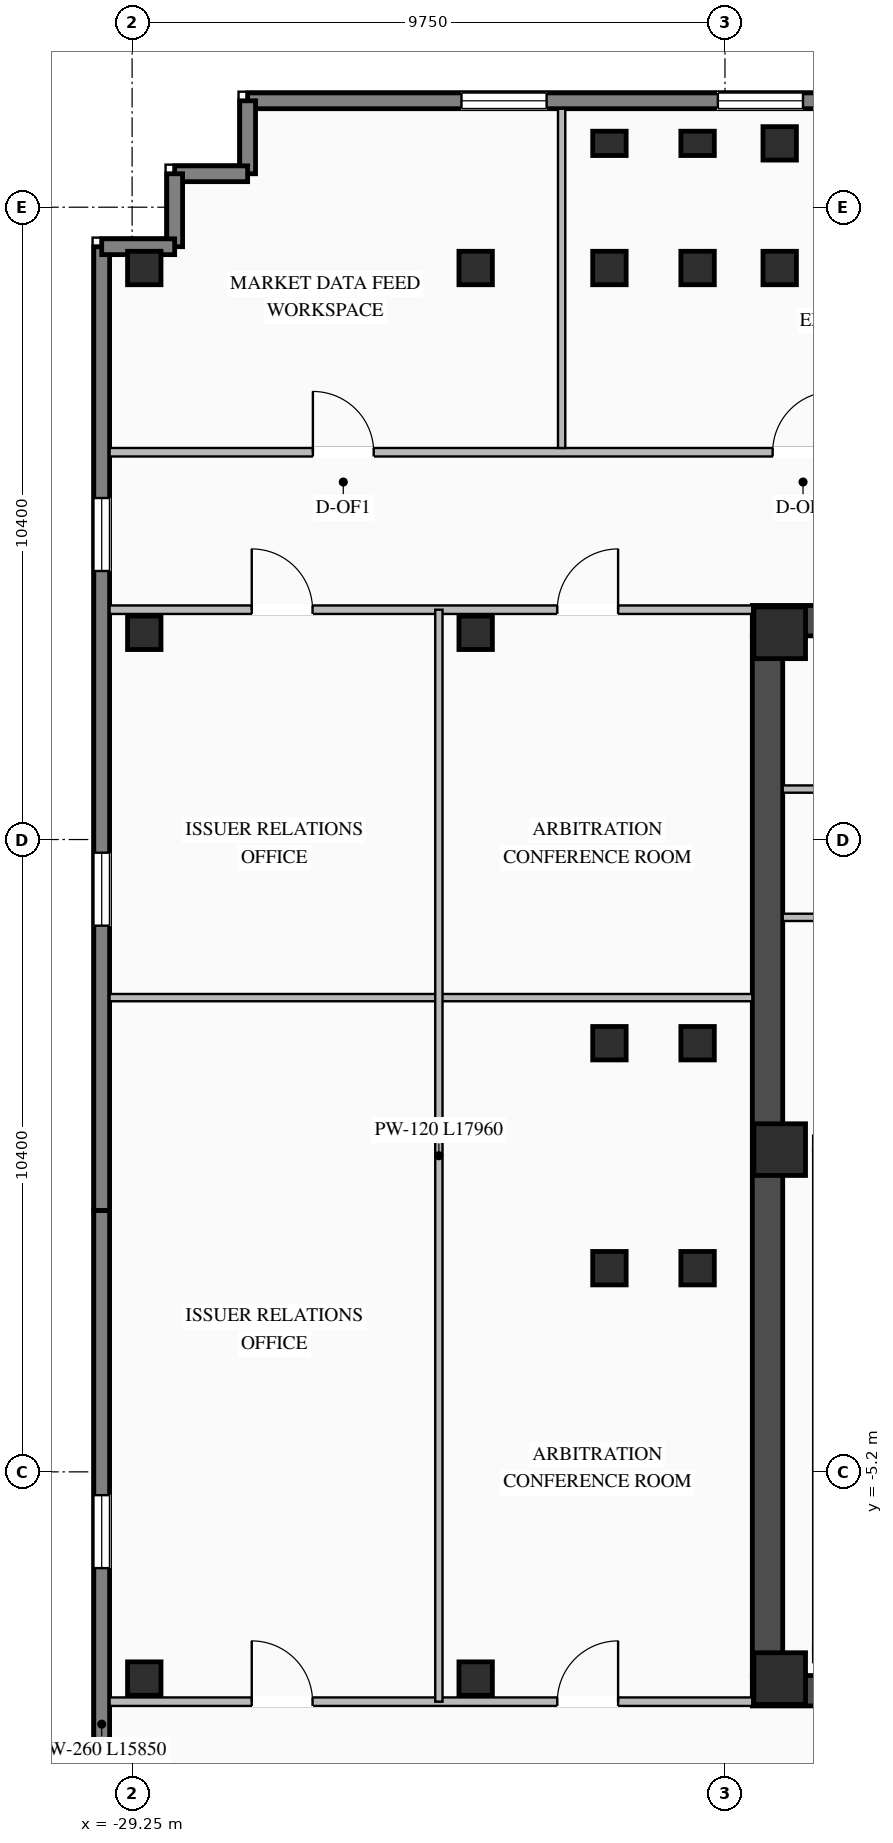
"""IFC4 building model, lengths in metres.
Left out: names, types, materials, properties, quantities, classifications, styles, units other than length and angle.
Written with IfcOpenShell. Run it as: python <this file> out.ifc"""

import sys

from ifc_helpers import new_model, si_unit, direction, frame, frame_2d, origin, origin_2d, place, context, subcontext, project, spatial, rectangle, i_section, extrude, element, fill, save


model = new_model("IFC4")
c1 = context("Model", 3, precision=1e-05, world=origin(), true_north=direction((0.0, 1.0)))
c2 = subcontext(c1, "Body", "Model", "MODEL_VIEW")
j1 = project(units=[si_unit("LENGTHUNIT", "METRE"), si_unit("PLANEANGLEUNIT", "RADIAN")], contexts=[c1])
p1 = place(None, origin())
s1 = spatial("IfcSite", under=j1, at=p1, CompositionType="ELEMENT")
p2 = place(p1, origin())
s2 = spatial("IfcBuilding", under=s1, at=p2, CompositionType="ELEMENT")
p3 = place(p2, frame((0.0, 0.0, 236.1)))
s3 = spatial("IfcBuildingStorey", under=s2, at=p3, CompositionType="ELEMENT", Elevation=236.1)
p4 = place(p3, frame((-19.05, -8.8, 0.0), z_axis=(0.0, 0.0, 1.0), x_axis=(1.0, 0.0, 0.0)))
e1 = element("IfcWall", 1, at=p4, inside=s3, PredefinedType="SHEAR", context=c2, shape_type="SweptSolid", body=[
    extrude(rectangle(XDim=10.25, YDim=0.5, at=frame_2d((5.125, 0.0))), origin(), (0.0, 0.0, 1.0), 3.27),
])
p5 = place(p3, frame((-19.05, 8.8, 0.0), z_axis=(0.0, 0.0, 1.0), x_axis=(1.0, 0.0, 0.0)))
e2 = element("IfcWall", 2, at=p5, inside=s3, PredefinedType="SHEAR", context=c2, shape_type="SweptSolid", body=[
    extrude(rectangle(XDim=10.25, YDim=0.5, at=frame_2d((5.125, 0.0))), origin(), (0.0, 0.0, 1.0), 3.27),
])
p6 = place(p5, frame((5.6, 0.0, 0.0)))
e3 = element("IfcOpeningElement", 3, at=p6, cuts=e2, PredefinedType="OPENING", context=c2, shape_type="SweptSolid", body=[
    extrude(rectangle(XDim=1.4, YDim=2.05, at=frame_2d((0.7, 1.025))), frame((0.0, 0.26, 0.0), z_axis=(0.0, -1.0, 0.0), x_axis=(1.0, 0.0, 0.0)), (0.0, 0.0, 1.0), 0.52),
])
p7 = place(p3, frame((-18.8, -8.55, 0.0), z_axis=(0.0, 0.0, 1.0), x_axis=(0.0, 1.0, 0.0)))
e4 = element("IfcWall", 4, at=p7, inside=s3, PredefinedType="SHEAR", context=c2, shape_type="SweptSolid", body=[
    extrude(rectangle(XDim=17.1, YDim=0.5, at=frame_2d((8.55, 0.0))), origin(), (0.0, 0.0, 1.0), 3.27),
])
for number, where, z_axis, x_axis in (
    (5, (-18.6, -8.6, 0.0), (0.0, 0.0, 1.0), (1.0, 0.0, 0.0)),
    (6, (-18.6, 0.1, 0.0), (0.0, 0.0, 1.0), (1.0, 0.0, 0.0)),
    (7, (-18.6, 8.6, 0.0), (0.0, 0.0, 1.0), (1.0, 0.0, 0.0)),
):
    element("IfcColumn", number, at=place(p3, frame(where, z_axis=z_axis, x_axis=x_axis)), inside=s3, PredefinedType="COLUMN", context=c2, shape_type="SweptSolid", body=[
        extrude(rectangle(XDim=0.85, YDim=0.85, at=origin_2d()), origin(), (0.0, 0.0, 1.0), 3.45),
    ])
for number, where, z_axis, x_axis in (
    (8, (-21.4, 14.6, 0.0), (0.0, 0.0, 1.0), (1.0, 0.0, 0.0)),
    (9, (-19.95, 14.6, 0.0), (0.0, 0.0, 1.0), (1.0, 0.0, 0.0)),
    (10, (-18.6, 14.6, 0.0), (0.0, 0.0, 1.0), (1.0, 0.0, 0.0)),
    (11, (-21.4, -1.85, 0.0), (0.0, 0.0, 1.0), (1.0, 0.0, 0.0)),
    (12, (-21.4, 1.85, 0.0), (0.0, 0.0, 1.0), (1.0, 0.0, 0.0)),
    (13, (-19.95, -1.85, 0.0), (0.0, 0.0, 1.0), (1.0, 0.0, 0.0)),
    (14, (-19.95, 1.85, 0.0), (0.0, 0.0, 1.0), (1.0, 0.0, 0.0)),
    (15, (-23.6, -8.6, 0.0), (0.0, 0.0, 1.0), (1.0, 0.0, 0.0)),
    (16, (-23.6, 8.6, 0.0), (0.0, 0.0, 1.0), (1.0, 0.0, 0.0)),
    (17, (-23.6, 14.6, 0.0), (0.0, 0.0, 1.0), (1.0, 0.0, 0.0)),
    (18, (-18.6, 16.65, 0.0), (0.0, 0.0, 1.0), (1.0, 0.0, 0.0)),
    (19, (-29.05, -8.6, 0.0), (0.0, 0.0, 1.0), (1.0, 0.0, 0.0)),
    (20, (-29.05, 8.6, 0.0), (0.0, 0.0, 1.0), (1.0, 0.0, 0.0)),
    (21, (-29.05, 14.6, 0.0), (0.0, 0.0, 1.0), (1.0, 0.0, 0.0)),
):
    element("IfcColumn", number, at=place(p3, frame(where, z_axis=z_axis, x_axis=x_axis)), inside=s3, PredefinedType="COLUMN", context=c2, shape_type="SweptSolid", body=[
        extrude(i_section(OverallWidth=0.55, OverallDepth=0.55, WebThickness=0.024, FlangeThickness=0.036, at=origin_2d()), origin(), (0.0, 0.0, 1.0), 3.45),
    ])
for number, where, z_axis, x_axis in (
    (22, (-21.4, 16.65, 0.0), (0.0, 0.0, 1.0), (1.0, 0.0, 0.0)),
    (23, (-19.95, 16.65, 0.0), (0.0, 0.0, 1.0), (1.0, 0.0, 0.0)),
):
    element("IfcColumn", number, at=place(p3, frame(where, z_axis=z_axis, x_axis=x_axis)), inside=s3, PredefinedType="PILASTER", context=c2, shape_type="SweptSolid", body=[
        extrude(rectangle(XDim=0.55, YDim=0.4, at=origin_2d()), origin(), (0.0, 0.0, 1.0), 3.45),
    ])
p8 = place(p3, frame((-27.35, 17.35, 0.0), z_axis=(0.0, 0.0, 1.0), x_axis=(1.0, 0.0, 0.0)))
e24 = element("IfcWall", 24, at=p8, inside=s3, PredefinedType="STANDARD", context=c2, shape_type="SweptSolid", body=[
    extrude(rectangle(XDim=12.65, YDim=0.26, at=frame_2d((6.325, 0.0))), origin(), (0.0, 0.0, 1.0), 3.25),
])
p9 = place(p8, frame((3.517, 0.0, 0.76)))
e25 = element("IfcOpeningElement", 25, at=p9, cuts=e24, PredefinedType="OPENING", context=c2, shape_type="SweptSolid", body=[
    extrude(rectangle(XDim=1.4, YDim=1.95, at=frame_2d((0.7, 0.975))), frame((0.0, 0.14, 0.0), z_axis=(0.0, -1.0, 0.0), x_axis=(1.0, 0.0, 0.0)), (0.0, 0.0, 1.0), 0.28),
])
p10 = place(p8, frame((7.733, 0.0, 0.76)))
e26 = element("IfcOpeningElement", 26, at=p10, cuts=e24, PredefinedType="OPENING", context=c2, shape_type="SweptSolid", body=[
    extrude(rectangle(XDim=1.4, YDim=1.95, at=frame_2d((0.7, 0.975))), frame((0.0, 0.14, 0.0), z_axis=(0.0, -1.0, 0.0), x_axis=(1.0, 0.0, 0.0)), (0.0, 0.0, 1.0), 0.28),
])
p11 = place(p3, frame((-29.75, -16.75, 0.0), z_axis=(0.0, 0.0, 1.0), x_axis=(0.0, 1.0, 0.0)))
e27 = element("IfcWall", 27, at=p11, inside=s3, PredefinedType="STANDARD", context=c2, shape_type="SweptSolid", body=[
    extrude(rectangle(XDim=15.85, YDim=0.26, at=frame_2d((7.925, 0.0))), origin(), (0.0, 0.0, 1.0), 3.25),
])
p12 = place(p11, frame((3.633, 0.0, 0.76)))
e28 = element("IfcOpeningElement", 28, at=p12, cuts=e27, PredefinedType="OPENING", context=c2, shape_type="SweptSolid", body=[
    extrude(rectangle(XDim=1.2, YDim=1.95, at=frame_2d((0.6, 0.975))), frame((0.0, 0.14, 0.0), z_axis=(0.0, -1.0, 0.0), x_axis=(1.0, 0.0, 0.0)), (0.0, 0.0, 1.0), 0.28),
])
p13 = place(p11, frame((9.967, 0.0, 0.76)))
e29 = element("IfcOpeningElement", 29, at=p13, cuts=e27, PredefinedType="OPENING", context=c2, shape_type="SweptSolid", body=[
    extrude(rectangle(XDim=1.2, YDim=1.95, at=frame_2d((0.6, 0.975))), frame((0.0, 0.14, 0.0), z_axis=(0.0, -1.0, 0.0), x_axis=(1.0, 0.0, 0.0)), (0.0, 0.0, 1.0), 0.28),
])
p14 = place(p3, frame((-29.75, -0.9, 0.0), z_axis=(0.0, 0.0, 1.0), x_axis=(0.0, 1.0, 0.0)))
e30 = element("IfcWall", 30, at=p14, inside=s3, PredefinedType="STANDARD", context=c2, shape_type="SweptSolid", body=[
    extrude(rectangle(XDim=15.85, YDim=0.26, at=frame_2d((7.925, 0.0))), origin(), (0.0, 0.0, 1.0), 3.25),
])
p15 = place(p14, frame((4.683, 0.0, 0.76)))
e31 = element("IfcOpeningElement", 31, at=p15, cuts=e30, PredefinedType="OPENING", context=c2, shape_type="SweptSolid", body=[
    extrude(rectangle(XDim=1.2, YDim=1.95, at=frame_2d((0.6, 0.975))), frame((0.0, 0.14, 0.0), z_axis=(0.0, -1.0, 0.0), x_axis=(1.0, 0.0, 0.0)), (0.0, 0.0, 1.0), 0.28),
])
p16 = place(p14, frame((10.517, 0.0, 0.76)))
e32 = element("IfcOpeningElement", 32, at=p16, cuts=e30, PredefinedType="OPENING", context=c2, shape_type="SweptSolid", body=[
    extrude(rectangle(XDim=1.2, YDim=1.95, at=frame_2d((0.6, 0.975))), frame((0.0, 0.14, 0.0), z_axis=(0.0, -1.0, 0.0), x_axis=(1.0, 0.0, 0.0)), (0.0, 0.0, 1.0), 0.28),
])
p17 = place(p3, frame((-27.35, 17.35, 0.0), z_axis=(0.0, 0.0, 1.0), x_axis=(0.0, -1.0, 0.0)))
e33 = element("IfcWall", 33, at=p17, inside=s3, PredefinedType="STANDARD", context=c2, shape_type="SweptSolid", body=[
    extrude(rectangle(XDim=1.2, YDim=0.26, at=frame_2d((0.6, 0.0))), origin(), (0.0, 0.0, 1.0), 2.565),
])
for number, where, z_axis, x_axis in (
    (34, (-27.35, 16.15, 0.0), (0.0, 0.0, 1.0), (-1.0, 0.0, 0.0)),
    (35, (-28.55, 16.15, 0.0), (0.0, 0.0, 1.0), (0.0, -1.0, 0.0)),
    (36, (-28.55, 14.95, 0.0), (0.0, 0.0, 1.0), (-1.0, 0.0, 0.0)),
):
    element("IfcWall", number, at=place(p3, frame(where, z_axis=z_axis, x_axis=x_axis)), inside=s3, PredefinedType="STANDARD", context=c2, shape_type="SweptSolid", body=[
        extrude(rectangle(XDim=1.2, YDim=0.26, at=frame_2d((0.6, 0.0))), origin(), (0.0, 0.0, 1.0), 2.565),
    ])
p18 = place(p3, frame((-18.55, 3.92, 0.0), z_axis=(0.0, 0.0, 1.0), x_axis=(1.0, 0.0, 0.0)))
e37 = element("IfcWall", 37, at=p18, inside=s3, PredefinedType="STANDARD", context=c2, shape_type="SweptSolid", body=[
    extrude(rectangle(XDim=4.65, YDim=0.12, at=frame_2d((2.325, 0.0))), origin(), (0.0, 0.0, 1.0), 3.25),
])
p19 = place(p3, frame((-18.55, 6.03, 0.0), z_axis=(0.0, 0.0, 1.0), x_axis=(1.0, 0.0, 0.0)))
e38 = element("IfcWall", 38, at=p19, inside=s3, PredefinedType="STANDARD", context=c2, shape_type="SweptSolid", body=[
    extrude(rectangle(XDim=2.4, YDim=0.12, at=frame_2d((1.2, 0.0))), origin(), (0.0, 0.0, 1.0), 3.25),
])
p20 = place(p3, frame((-29.62, 11.57, 0.0), z_axis=(0.0, 0.0, 1.0), x_axis=(1.0, 0.0, 0.0)))
e39 = element("IfcWall", 39, at=p20, inside=s3, PredefinedType="STANDARD", context=c2, shape_type="SweptSolid", body=[
    extrude(rectangle(XDim=56.84, YDim=0.14, at=frame_2d((28.42, 0.0))), origin(), (0.0, 0.0, 1.0), 2.845),
])
p21 = place(p20, frame((3.343, 0.0, 0.0)))
e40 = element("IfcOpeningElement", 40, at=p21, cuts=e39, PredefinedType="OPENING", context=c2, shape_type="SweptSolid", body=[
    extrude(rectangle(XDim=1.0, YDim=2.08, at=frame_2d((0.5, 1.04))), frame((0.0, 0.08, 0.0), z_axis=(0.0, -1.0, 0.0), x_axis=(1.0, 0.0, 0.0)), (0.0, 0.0, 1.0), 0.16),
])
p22 = place(p20, frame((10.904, 0.0, 0.0)))
e41 = element("IfcOpeningElement", 41, at=p22, cuts=e39, PredefinedType="OPENING", context=c2, shape_type="SweptSolid", body=[
    extrude(rectangle(XDim=1.0, YDim=2.08, at=frame_2d((0.5, 1.04))), frame((0.0, 0.08, 0.0), z_axis=(0.0, -1.0, 0.0), x_axis=(1.0, 0.0, 0.0)), (0.0, 0.0, 1.0), 0.16),
])
p23 = place(p20, frame((19.128, 0.0, 0.0)))
e42 = element("IfcOpeningElement", 42, at=p23, cuts=e39, PredefinedType="OPENING", context=c2, shape_type="SweptSolid", body=[
    extrude(rectangle(XDim=1.0, YDim=2.08, at=frame_2d((0.5, 1.04))), frame((0.0, 0.08, 0.0), z_axis=(0.0, -1.0, 0.0), x_axis=(1.0, 0.0, 0.0)), (0.0, 0.0, 1.0), 0.16),
])
p24 = place(p20, frame((27.636, 0.0, 0.0)))
e43 = element("IfcOpeningElement", 43, at=p24, cuts=e39, PredefinedType="OPENING", context=c2, shape_type="SweptSolid", body=[
    extrude(rectangle(XDim=1.0, YDim=2.08, at=frame_2d((0.5, 1.04))), frame((0.0, 0.08, 0.0), z_axis=(0.0, -1.0, 0.0), x_axis=(1.0, 0.0, 0.0)), (0.0, 0.0, 1.0), 0.16),
])
p25 = place(p20, frame((36.144, 0.0, 0.0)))
e44 = element("IfcOpeningElement", 44, at=p25, cuts=e39, PredefinedType="OPENING", context=c2, shape_type="SweptSolid", body=[
    extrude(rectangle(XDim=1.0, YDim=2.08, at=frame_2d((0.5, 1.04))), frame((0.0, 0.08, 0.0), z_axis=(0.0, -1.0, 0.0), x_axis=(1.0, 0.0, 0.0)), (0.0, 0.0, 1.0), 0.16),
])
p26 = place(p20, frame((44.368, 0.0, 0.0)))
e45 = element("IfcOpeningElement", 45, at=p26, cuts=e39, PredefinedType="OPENING", context=c2, shape_type="SweptSolid", body=[
    extrude(rectangle(XDim=1.0, YDim=2.08, at=frame_2d((0.5, 1.04))), frame((0.0, 0.08, 0.0), z_axis=(0.0, -1.0, 0.0), x_axis=(1.0, 0.0, 0.0)), (0.0, 0.0, 1.0), 0.16),
])
p27 = place(p20, frame((52.213, 0.0, 0.0)))
e46 = element("IfcOpeningElement", 46, at=p27, cuts=e39, PredefinedType="OPENING", context=c2, shape_type="SweptSolid", body=[
    extrude(rectangle(XDim=1.0, YDim=2.08, at=frame_2d((0.5, 1.04))), frame((0.0, 0.08, 0.0), z_axis=(0.0, -1.0, 0.0), x_axis=(1.0, 0.0, 0.0)), (0.0, 0.0, 1.0), 0.16),
])
p28 = place(p3, frame((-22.186, 11.64, 0.0), z_axis=(0.0, 0.0, 1.0), x_axis=(0.0, 1.0, 0.0)))
e47 = element("IfcWall", 47, at=p28, inside=s3, PredefinedType="STANDARD", context=c2, shape_type="SweptSolid", body=[
    extrude(rectangle(XDim=5.58, YDim=0.12, at=frame_2d((2.79, 0.0))), origin(), (0.0, 0.0, 1.0), 3.25),
])
p29 = place(p3, frame((-29.62, 8.98, 0.0), z_axis=(0.0, 0.0, 1.0), x_axis=(1.0, 0.0, 0.0)))
e48 = element("IfcWall", 48, at=p29, inside=s3, PredefinedType="STANDARD", context=c2, shape_type="SweptSolid", body=[
    extrude(rectangle(XDim=10.57, YDim=0.14, at=frame_2d((5.285, 0.0))), origin(), (0.0, 0.0, 1.0), 3.25),
])
p30 = place(p29, frame((2.337, 0.0, 0.0)))
e49 = element("IfcOpeningElement", 49, at=p30, cuts=e48, PredefinedType="OPENING", context=c2, shape_type="SweptSolid", body=[
    extrude(rectangle(XDim=1.0, YDim=2.08, at=frame_2d((0.5, 1.04))), frame((0.0, 0.08, 0.0), z_axis=(0.0, -1.0, 0.0), x_axis=(1.0, 0.0, 0.0)), (0.0, 0.0, 1.0), 0.16),
])
p31 = place(p29, frame((7.363, 0.0, 0.0)))
e50 = element("IfcOpeningElement", 50, at=p31, cuts=e48, PredefinedType="OPENING", context=c2, shape_type="SweptSolid", body=[
    extrude(rectangle(XDim=1.0, YDim=2.08, at=frame_2d((0.5, 1.04))), frame((0.0, 0.08, 0.0), z_axis=(0.0, -1.0, 0.0), x_axis=(1.0, 0.0, 0.0)), (0.0, 0.0, 1.0), 0.16),
])
p32 = place(p3, frame((-29.62, -8.98, 0.0), z_axis=(0.0, 0.0, 1.0), x_axis=(1.0, 0.0, 0.0)))
e51 = element("IfcWall", 51, at=p32, inside=s3, PredefinedType="STANDARD", context=c2, shape_type="SweptSolid", body=[
    extrude(rectangle(XDim=10.57, YDim=0.14, at=frame_2d((5.285, 0.0))), origin(), (0.0, 0.0, 1.0), 3.25),
])
p33 = place(p32, frame((2.337, 0.0, 0.0)))
e52 = element("IfcOpeningElement", 52, at=p33, cuts=e51, PredefinedType="OPENING", context=c2, shape_type="SweptSolid", body=[
    extrude(rectangle(XDim=1.0, YDim=2.08, at=frame_2d((0.5, 1.04))), frame((0.0, 0.08, 0.0), z_axis=(0.0, -1.0, 0.0), x_axis=(1.0, 0.0, 0.0)), (0.0, 0.0, 1.0), 0.16),
])
p34 = place(p32, frame((7.363, 0.0, 0.0)))
e53 = element("IfcOpeningElement", 53, at=p34, cuts=e51, PredefinedType="OPENING", context=c2, shape_type="SweptSolid", body=[
    extrude(rectangle(XDim=1.0, YDim=2.08, at=frame_2d((0.5, 1.04))), frame((0.0, 0.08, 0.0), z_axis=(0.0, -1.0, 0.0), x_axis=(1.0, 0.0, 0.0)), (0.0, 0.0, 1.0), 0.16),
])
p35 = place(p3, frame((-29.62, 2.6, 0.0), z_axis=(0.0, 0.0, 1.0), x_axis=(1.0, 0.0, 0.0)))
e54 = element("IfcWall", 54, at=p35, inside=s3, PredefinedType="STANDARD", context=c2, shape_type="SweptSolid", body=[
    extrude(rectangle(XDim=10.57, YDim=0.12, at=frame_2d((5.285, 0.0))), origin(), (0.0, 0.0, 1.0), 3.25),
])
p36 = place(p3, frame((-24.205, -8.98, 0.0), z_axis=(0.0, 0.0, 1.0), x_axis=(0.0, 1.0, 0.0)))
e55 = element("IfcWall", 55, at=p36, inside=s3, PredefinedType="STANDARD", context=c2, shape_type="SweptSolid", body=[
    extrude(rectangle(XDim=17.96, YDim=0.12, at=frame_2d((8.98, 0.0))), origin(), (0.0, 0.0, 1.0), 3.25),
])
p37 = place(p9, origin())
e56 = element("IfcWindow", 56, at=p37, inside=s3, PartitioningType="SINGLE_PANEL", PredefinedType="WINDOW", context=c2, shape_type="SweptSolid", body=[
    extrude(rectangle(XDim=1.4, YDim=1.95, at=frame_2d((0.7, 0.975))), frame((0.0, 0.03, 0.0), z_axis=(0.0, -1.0, 0.0), x_axis=(1.0, 0.0, 0.0)), (0.0, 0.0, 1.0), 0.06),
])
fill(e25, e56)
p38 = place(p10, origin())
e57 = element("IfcWindow", 57, at=p38, inside=s3, PartitioningType="SINGLE_PANEL", PredefinedType="WINDOW", context=c2, shape_type="SweptSolid", body=[
    extrude(rectangle(XDim=1.4, YDim=1.95, at=frame_2d((0.7, 0.975))), frame((0.0, 0.03, 0.0), z_axis=(0.0, -1.0, 0.0), x_axis=(1.0, 0.0, 0.0)), (0.0, 0.0, 1.0), 0.06),
])
fill(e26, e57)
p39 = place(p13, origin())
e58 = element("IfcWindow", 58, at=p39, inside=s3, PartitioningType="SINGLE_PANEL", PredefinedType="WINDOW", context=c2, shape_type="SweptSolid", body=[
    extrude(rectangle(XDim=1.2, YDim=1.95, at=frame_2d((0.6, 0.975))), frame((0.0, 0.03, 0.0), z_axis=(0.0, -1.0, 0.0), x_axis=(1.0, 0.0, 0.0)), (0.0, 0.0, 1.0), 0.06),
])
fill(e29, e58)
p40 = place(p15, origin())
e59 = element("IfcWindow", 59, at=p40, inside=s3, PartitioningType="SINGLE_PANEL", PredefinedType="WINDOW", context=c2, shape_type="SweptSolid", body=[
    extrude(rectangle(XDim=1.2, YDim=1.95, at=frame_2d((0.6, 0.975))), frame((0.0, 0.03, 0.0), z_axis=(0.0, -1.0, 0.0), x_axis=(1.0, 0.0, 0.0)), (0.0, 0.0, 1.0), 0.06),
])
fill(e31, e59)
p41 = place(p16, origin())
e60 = element("IfcWindow", 60, at=p41, inside=s3, PartitioningType="SINGLE_PANEL", PredefinedType="WINDOW", context=c2, shape_type="SweptSolid", body=[
    extrude(rectangle(XDim=1.2, YDim=1.95, at=frame_2d((0.6, 0.975))), frame((0.0, 0.03, 0.0), z_axis=(0.0, -1.0, 0.0), x_axis=(1.0, 0.0, 0.0)), (0.0, 0.0, 1.0), 0.06),
])
fill(e32, e60)
p42 = place(p21, origin())
e61 = element("IfcDoor", 61, at=p42, inside=s3, OperationType="SINGLE_SWING_LEFT", PredefinedType="DOOR", context=c2, shape_type="SweptSolid", body=[
    extrude(rectangle(XDim=1.0, YDim=2.08, at=frame_2d((0.5, 1.04))), frame((0.0, 0.025, 0.0), z_axis=(0.0, -1.0, 0.0), x_axis=(1.0, 0.0, 0.0)), (0.0, 0.0, 1.0), 0.05),
])
fill(e40, e61)
p43 = place(p22, origin())
e62 = element("IfcDoor", 62, at=p43, inside=s3, OperationType="SINGLE_SWING_RIGHT", PredefinedType="DOOR", context=c2, shape_type="SweptSolid", body=[
    extrude(rectangle(XDim=1.0, YDim=2.08, at=frame_2d((0.5, 1.04))), frame((0.0, 0.025, 0.0), z_axis=(0.0, -1.0, 0.0), x_axis=(1.0, 0.0, 0.0)), (0.0, 0.0, 1.0), 0.05),
])
fill(e41, e62)
p44 = place(p30, origin())
e63 = element("IfcDoor", 63, at=p44, inside=s3, OperationType="SINGLE_SWING_LEFT", PredefinedType="DOOR", context=c2, shape_type="SweptSolid", body=[
    extrude(rectangle(XDim=1.0, YDim=2.08, at=frame_2d((0.5, 1.04))), frame((0.0, 0.025, 0.0), z_axis=(0.0, -1.0, 0.0), x_axis=(1.0, 0.0, 0.0)), (0.0, 0.0, 1.0), 0.05),
])
fill(e49, e63)
p45 = place(p31, origin())
e64 = element("IfcDoor", 64, at=p45, inside=s3, OperationType="SINGLE_SWING_RIGHT", PredefinedType="DOOR", context=c2, shape_type="SweptSolid", body=[
    extrude(rectangle(XDim=1.0, YDim=2.08, at=frame_2d((0.5, 1.04))), frame((0.0, 0.025, 0.0), z_axis=(0.0, -1.0, 0.0), x_axis=(1.0, 0.0, 0.0)), (0.0, 0.0, 1.0), 0.05),
])
fill(e50, e64)
p46 = place(p33, origin())
e65 = element("IfcDoor", 65, at=p46, inside=s3, OperationType="SINGLE_SWING_LEFT", PredefinedType="DOOR", context=c2, shape_type="SweptSolid", body=[
    extrude(rectangle(XDim=1.0, YDim=2.08, at=frame_2d((0.5, 1.04))), frame((0.0, 0.025, 0.0), z_axis=(0.0, -1.0, 0.0), x_axis=(1.0, 0.0, 0.0)), (0.0, 0.0, 1.0), 0.05),
])
fill(e52, e65)
p47 = place(p34, origin())
e66 = element("IfcDoor", 66, at=p47, inside=s3, OperationType="SINGLE_SWING_RIGHT", PredefinedType="DOOR", context=c2, shape_type="SweptSolid", body=[
    extrude(rectangle(XDim=1.0, YDim=2.08, at=frame_2d((0.5, 1.04))), frame((0.0, 0.025, 0.0), z_axis=(0.0, -1.0, 0.0), x_axis=(1.0, 0.0, 0.0)), (0.0, 0.0, 1.0), 0.05),
])
fill(e53, e66)
save(model, sys.argv[1])
